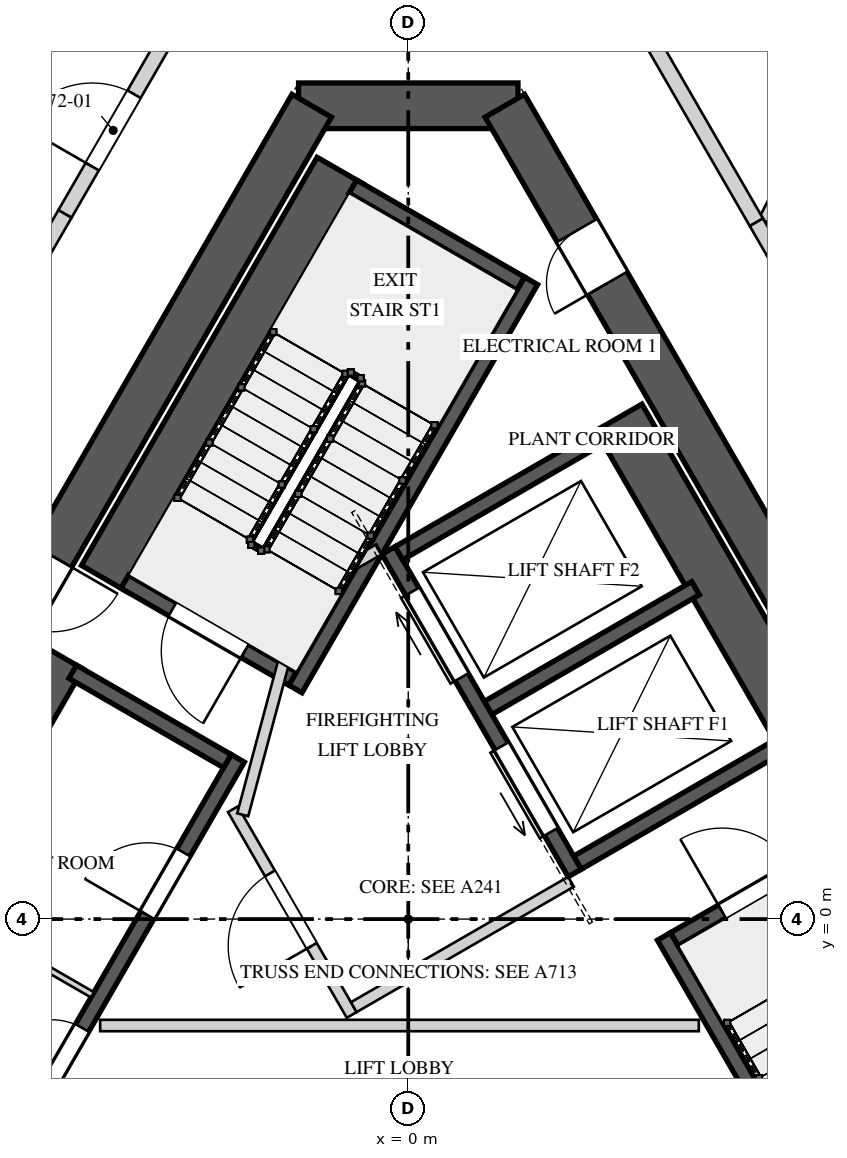
"""IFC4 building model, lengths in metres.
Left out: names, types, materials, properties, quantities, classifications, styles, units other than length and angle.
Written with IfcOpenShell. Run it as: python <this file> out.ifc"""

import sys

from ifc_helpers import new_model, si_unit, direction, frame, frame_2d, origin, place, context, subcontext, project, spatial, rectangle, extrude, element, fill, save


model = new_model("IFC4")
c1 = context("Model", 3, precision=1e-05, world=origin(), true_north=direction((0.0, 1.0)))
c2 = subcontext(c1, "Body", "Model", "MODEL_VIEW")
j1 = project(units=[si_unit("LENGTHUNIT", "METRE"), si_unit("PLANEANGLEUNIT", "RADIAN")], contexts=[c1])
p1 = place(None, origin())
s1 = spatial("IfcSite", under=j1, at=p1, CompositionType="ELEMENT")
p2 = place(p1, origin())
s2 = spatial("IfcBuilding", under=s1, at=p2, CompositionType="ELEMENT")
p3 = place(p2, frame((0.0, 0.0, 306.4)))
s3 = spatial("IfcBuildingStorey", under=s2, at=p3, CompositionType="ELEMENT", Elevation=306.4)
p4 = place(p3, frame((1.443, 10.7, 0.0), z_axis=(0.0, 0.0, 1.0), x_axis=(-1.0, 0.0, 0.0)))
e1 = element("IfcWall", 1, at=p4, inside=s3, PredefinedType="SHEAR", context=c2, shape_type="SweptSolid", body=[
    extrude(rectangle(XDim=2.887, YDim=0.6, at=frame_2d((1.443, 0.0))), origin(), (0.0, 0.0, 1.0), 14.0),
])
p5 = place(p3, frame((-1.27, 10.7, 0.0), z_axis=(0.0, 0.0, 1.0), x_axis=(-0.499999536116, -0.866025671608, 0.0)))
e2 = element("IfcWall", 2, at=p5, inside=s3, PredefinedType="SHEAR", context=c2, shape_type="SweptSolid", body=[
    extrude(rectangle(XDim=17.263, YDim=0.6, at=frame_2d((8.631, 0.0))), origin(), (0.0, 0.0, 1.0), 14.0),
])
p6 = place(p5, frame((6.836, 0.0, 0.0)))
e3 = element("IfcOpeningElement", 3, at=p6, cuts=e2, PredefinedType="OPENING", context=c2, shape_type="SweptSolid", body=[
    extrude(rectangle(XDim=1.0, YDim=2.4, at=frame_2d((0.5, 1.2))), frame((0.0, 0.31, 0.0), z_axis=(0.0, -1.0, 0.0), x_axis=(1.0, 0.0, 0.0)), (0.0, 0.0, 1.0), 0.62),
])
p7 = place(p3, frame((9.902, -4.25, 0.0), z_axis=(0.0, 0.0, 1.0), x_axis=(-0.499999536116, 0.866025671608, 0.0)))
e4 = element("IfcWall", 4, at=p7, inside=s3, PredefinedType="SHEAR", context=c2, shape_type="SweptSolid", body=[
    extrude(rectangle(XDim=17.263, YDim=0.6, at=frame_2d((8.631, 0.0))), origin(), (0.0, 0.0, 1.0), 14.0),
])
p8 = place(p7, frame((6.906, 0.0, 0.0)))
e5 = element("IfcOpeningElement", 5, at=p8, cuts=e4, PredefinedType="OPENING", context=c2, shape_type="SweptSolid", body=[
    extrude(rectangle(XDim=1.0, YDim=2.4, at=frame_2d((0.5, 1.2))), frame((0.0, 0.31, 0.0), z_axis=(0.0, -1.0, 0.0), x_axis=(1.0, 0.0, 0.0)), (0.0, 0.0, 1.0), 0.62),
])
p9 = place(p7, frame((14.567, 0.0, 0.0)))
e6 = element("IfcOpeningElement", 6, at=p9, cuts=e4, PredefinedType="OPENING", context=c2, shape_type="SweptSolid", body=[
    extrude(rectangle(XDim=0.8, YDim=2.1, at=frame_2d((0.4, 1.05))), frame((0.0, 0.31, 0.0), z_axis=(0.0, -1.0, 0.0), x_axis=(1.0, 0.0, 0.0)), (0.0, 0.0, 1.0), 0.62),
])
p10 = place(p3, frame((-0.896, 9.847, 0.0), z_axis=(0.0, 0.0, 1.0), x_axis=(-0.500009909098, -0.866019682689, 0.0)))
e7 = element("IfcWall", 7, at=p10, inside=s3, PredefinedType="SOLIDWALL", context=c2, shape_type="SweptSolid", body=[
    extrude(rectangle(XDim=6.2, YDim=0.7, at=frame_2d((3.1, 0.0))), origin(), (0.0, 0.0, 1.0), 13.65),
])
p11 = place(p3, frame((1.615, 8.397, 0.0), z_axis=(0.0, 0.0, 1.0), x_axis=(-0.500009909098, -0.866019682689, 0.0)))
e8 = element("IfcWall", 8, at=p11, inside=s3, PredefinedType="SOLIDWALL", context=c2, shape_type="SweptSolid", body=[
    extrude(rectangle(XDim=6.2, YDim=0.2, at=frame_2d((3.1, 0.0))), origin(), (0.0, 0.0, 1.0), 13.65),
])
p12 = place(p3, frame((1.479, 8.361, 0.0), z_axis=(0.0, 0.0, 1.0), x_axis=(-0.865989465428, 0.500062241894, 0.0)))
e9 = element("IfcWall", 9, at=p12, inside=s3, PredefinedType="SOLIDWALL", context=c2, shape_type="SweptSolid", body=[
    extrude(rectangle(XDim=2.55, YDim=0.2, at=frame_2d((1.275, 0.0))), origin(), (0.0, 0.0, 1.0), 13.65),
])
p13 = place(p3, frame((-1.521, 3.165, 0.0), z_axis=(0.0, 0.0, 1.0), x_axis=(-0.866030925526, 0.499990435942, 0.0)))
e10 = element("IfcWall", 10, at=p13, inside=s3, PredefinedType="SOLIDWALL", context=c2, shape_type="SweptSolid", body=[
    extrude(rectangle(XDim=2.55, YDim=0.2, at=frame_2d((1.275, 0.0))), origin(), (0.0, 0.0, 1.0), 13.65),
])
p14 = place(p13, frame((0.725, 0.0, 0.0)))
e11 = element("IfcOpeningElement", 11, at=p14, cuts=e10, PredefinedType="OPENING", context=c2, shape_type="SweptSolid", body=[
    extrude(rectangle(XDim=1.1, YDim=2.4, at=frame_2d((0.55, 1.2))), frame((0.0, 0.11, 0.0), z_axis=(0.0, -1.0, 0.0), x_axis=(1.0, 0.0, 0.0)), (0.0, 0.0, 1.0), 0.22),
])
p15 = place(p3, frame((6.465, -5.597, 0.0), z_axis=(0.0, 0.0, 1.0), x_axis=(-0.49998037582, 0.866036733513, 0.0)))
e12 = element("IfcWall", 12, at=p15, inside=s3, PredefinedType="SOLIDWALL", context=c2, shape_type="SweptSolid", body=[
    extrude(rectangle(XDim=6.2, YDim=0.2, at=frame_2d((3.1, 0.0))), origin(), (0.0, 0.0, 1.0), 13.65),
])
p16 = place(p3, frame((3.501, -0.265, 0.0), z_axis=(0.0, 0.0, 1.0), x_axis=(0.866030925526, 0.499990435942, 0.0)))
e13 = element("IfcWall", 13, at=p16, inside=s3, PredefinedType="SOLIDWALL", context=c2, shape_type="SweptSolid", body=[
    extrude(rectangle(XDim=2.55, YDim=0.2, at=frame_2d((1.275, 0.0))), origin(), (0.0, 0.0, 1.0), 13.65),
])
p17 = place(p16, frame((0.725, 0.0, 0.0)))
e14 = element("IfcOpeningElement", 14, at=p17, cuts=e13, PredefinedType="OPENING", context=c2, shape_type="SweptSolid", body=[
    extrude(rectangle(XDim=1.1, YDim=2.4, at=frame_2d((0.55, 1.2))), frame((0.0, 0.11, 0.0), z_axis=(0.0, -1.0, 0.0), x_axis=(1.0, 0.0, 0.0)), (0.0, 0.0, 1.0), 0.22),
])
p18 = place(p3, frame((-4.993, -2.648, 0.0), z_axis=(0.0, 0.0, 1.0), x_axis=(0.499996545922, 0.866027397988, 0.0)))
e15 = element("IfcWall", 15, at=p18, inside=s3, PredefinedType="SOLIDWALL", context=c2, shape_type="SweptSolid", body=[
    extrude(rectangle(XDim=5.5, YDim=0.2, at=frame_2d((2.75, 0.0))), origin(), (0.0, 0.0, 1.0), 13.65),
])
p19 = place(p18, frame((3.12, 0.0, 0.0)))
e16 = element("IfcOpeningElement", 16, at=p19, cuts=e15, PredefinedType="OPENING", context=c2, shape_type="SweptSolid", body=[
    extrude(rectangle(XDim=0.95, YDim=2.4, at=frame_2d((0.475, 1.2))), frame((0.0, 0.11, 0.0), z_axis=(0.0, -1.0, 0.0), x_axis=(1.0, 0.0, 0.0)), (0.0, 0.0, 1.0), 0.22),
])
p20 = place(p18, frame((0.605, 0.0, 0.0)))
e17 = element("IfcOpeningElement", 17, at=p20, cuts=e15, PredefinedType="OPENING", context=c2, shape_type="SweptSolid", body=[
    extrude(rectangle(XDim=0.8, YDim=2.1, at=frame_2d((0.4, 1.05))), frame((0.0, 0.11, 0.0), z_axis=(0.0, -1.0, 0.0), x_axis=(1.0, 0.0, 0.0)), (0.0, 0.0, 1.0), 0.22),
])
p21 = place(p3, frame((-4.581, 3.465, 0.0), z_axis=(0.0, 0.0, 1.0), x_axis=(-0.499996545922, -0.866027397988, 0.0)))
e18 = element("IfcWall", 18, at=p21, inside=s3, PredefinedType="SOLIDWALL", context=c2, shape_type="SweptSolid", body=[
    extrude(rectangle(XDim=5.5, YDim=0.7, at=frame_2d((2.75, 0.0))), origin(), (0.0, 0.0, 1.0), 13.65),
])
p22 = place(p3, frame((-2.38, 2.078, 0.0), z_axis=(0.0, 0.0, 1.0), x_axis=(-0.866061024631, 0.499938297808, 0.0)))
e19 = element("IfcWall", 19, at=p22, inside=s3, PredefinedType="SOLIDWALL", context=c2, shape_type="SweptSolid", body=[
    extrude(rectangle(XDim=2.35, YDim=0.2, at=frame_2d((1.175, 0.0))), origin(), (0.0, 0.0, 1.0), 13.65),
])
p23 = place(p3, frame((-4.155, -0.996, 0.0), z_axis=(0.0, 0.0, 1.0), x_axis=(-0.866016039709, 0.500016218704, 0.0)))
e20 = element("IfcWall", 20, at=p23, inside=s3, PredefinedType="PARTITIONING", context=c2, shape_type="SweptSolid", body=[
    extrude(rectangle(XDim=2.35, YDim=0.08, at=frame_2d((1.175, 0.0))), origin(), (0.0, 0.0, 1.0), 13.65),
])
p24 = place(p3, frame((2.19, 0.606, 0.0), z_axis=(0.0, 0.0, 1.0), x_axis=(-0.500002801628, 0.866023786258, 0.0)))
e21 = element("IfcWall", 21, at=p24, inside=s3, PredefinedType="SOLIDWALL", context=c2, shape_type="SweptSolid", body=[
    extrude(rectangle(XDim=4.9, YDim=0.2, at=frame_2d((2.45, 0.0))), origin(), (0.0, 0.0, 1.0), 13.65),
])
p25 = place(p24, frame((0.625, 0.0, 0.0)))
e22 = element("IfcOpeningElement", 22, at=p25, cuts=e21, PredefinedType="OPENING", context=c2, shape_type="SweptSolid", body=[
    extrude(rectangle(XDim=1.3, YDim=2.1, at=frame_2d((0.65, 1.05))), frame((0.0, 0.11, 0.0), z_axis=(0.0, -1.0, 0.0), x_axis=(1.0, 0.0, 0.0)), (0.0, 0.0, 1.0), 0.22),
])
p26 = place(p24, frame((2.975, 0.0, 0.0)))
e23 = element("IfcOpeningElement", 23, at=p26, cuts=e21, PredefinedType="OPENING", context=c2, shape_type="SweptSolid", body=[
    extrude(rectangle(XDim=1.3, YDim=2.1, at=frame_2d((0.65, 1.05))), frame((0.0, 0.11, 0.0), z_axis=(0.0, -1.0, 0.0), x_axis=(1.0, 0.0, 0.0)), (0.0, 0.0, 1.0), 0.22),
])
p27 = place(p3, frame((5.221, 2.356, 0.0), z_axis=(0.0, 0.0, 1.0), x_axis=(-0.500040169509, 0.866002210665, 0.0)))
e24 = element("IfcWall", 24, at=p27, inside=s3, PredefinedType="SOLIDWALL", context=c2, shape_type="SweptSolid", body=[
    extrude(rectangle(XDim=4.9, YDim=0.7, at=frame_2d((2.45, 0.0))), origin(), (0.0, 0.0, 1.0), 13.65),
])
for number, where, z_axis, x_axis in (
    (25, (2.227, 0.743, 0.0), (0.0, 0.0, 1.0), (0.866, 0.5, 0.0)),
    (26, (1.052, 2.778, 0.0), (0.0, 0.0, 1.0), (0.866, 0.5, 0.0)),
    (27, (-0.123, 4.813, 0.0), (0.0, 0.0, 1.0), (0.866, 0.5, 0.0)),
):
    element("IfcWall", number, at=place(p3, frame(where, z_axis=z_axis, x_axis=x_axis)), inside=s3, PredefinedType="SOLIDWALL", context=c2, shape_type="SweptSolid", body=[
        extrude(rectangle(XDim=3.15, YDim=0.2, at=frame_2d((1.575, 0.0))), origin(), (0.0, 0.0, 1.0), 13.65),
    ])
p28 = place(p3, frame((-0.744, -1.261, 0.0), z_axis=(0.0, 0.0, 1.0), x_axis=(-0.500004234368, 0.866022959057, 0.0)))
e28 = element("IfcWall", 28, at=p28, inside=s3, PredefinedType="PARTITIONING", context=c2, shape_type="SweptSolid", body=[
    extrude(rectangle(XDim=3.125, YDim=0.15, at=frame_2d((1.562, 0.0))), origin(), (0.0, 0.0, 1.0), 13.65),
])
p29 = place(p28, frame((1.05, 0.0, 0.0)))
e29 = element("IfcOpeningElement", 29, at=p29, cuts=e28, PredefinedType="OPENING", context=c2, shape_type="SweptSolid", body=[
    extrude(rectangle(XDim=1.1, YDim=2.4, at=frame_2d((0.55, 1.2))), frame((0.0, 0.085, 0.0), z_axis=(0.0, -1.0, 0.0), x_axis=(1.0, 0.0, 0.0)), (0.0, 0.0, 1.0), 0.17),
])
p30 = place(p3, frame((-0.717, -1.159, 0.0), z_axis=(0.0, 0.0, 1.0), x_axis=(0.866008176907, 0.50002983664, 0.0)))
e30 = element("IfcWall", 30, at=p30, inside=s3, PredefinedType="PARTITIONING", context=c2, shape_type="SweptSolid", body=[
    extrude(rectangle(XDim=3.3, YDim=0.15, at=frame_2d((1.65, 0.0))), origin(), (0.0, 0.0, 1.0), 13.65),
])
p31 = place(p3, frame((-2.178, 1.372, 0.0), z_axis=(0.0, 0.0, 1.0), x_axis=(0.258808958833, 0.96592852884, 0.0)))
e31 = element("IfcWall", 31, at=p31, inside=s3, PredefinedType="PARTITIONING", context=c2, shape_type="SweptSolid", body=[
    extrude(rectangle(XDim=2.903, YDim=0.15, at=frame_2d((1.451, 0.0))), origin(), (0.0, 0.0, 1.0), 13.65),
])
p32 = place(p3, frame((-1.51, 4.215, 0.0), z_axis=(0.0, 0.0, 1.0), x_axis=(0.866085525409, 0.49989585183, 0.0)))
e32 = element("IfcWall", 32, at=p32, inside=s3, PredefinedType="PARTITIONING", context=c2, shape_type="SweptSolid", body=[
    extrude(rectangle(XDim=1.3, YDim=0.15, at=frame_2d((0.65, 0.0))), origin(), (0.0, 0.0, 1.0), 13.65),
])
p33 = place(p3, frame((-4.053, -1.4, 0.0), z_axis=(0.0, 0.0, 1.0), x_axis=(1.0, 0.0, 0.0)))
e33 = element("IfcWall", 33, at=p33, inside=s3, PredefinedType="PARTITIONING", context=c2, shape_type="SweptSolid", body=[
    extrude(rectangle(XDim=7.876, YDim=0.15, at=frame_2d((3.938, 0.0))), origin(), (0.0, 0.0, 1.0), 13.65),
])
p34 = place(p3, frame((5.843, 11.467, 0.0), z_axis=(0.0, 0.0, 1.0), x_axis=(-0.454001617185, -0.891000859479, 0.0)))
e34 = element("IfcWall", 34, at=p34, inside=s3, PredefinedType="PARTITIONING", context=c2, shape_type="SweptSolid", body=[
    extrude(rectangle(XDim=2.556, YDim=0.15, at=frame_2d((1.278, 0.0))), origin(), (0.0, 0.0, 1.0), 12.95),
])
p35 = place(p3, frame((-4.929, 8.563, 0.0), z_axis=(0.0, 0.0, 1.0), x_axis=(0.500046299512, 0.865998671098, 0.0)))
e35 = element("IfcWall", 35, at=p35, inside=s3, PredefinedType="SOLIDWALL", context=c2, shape_type="SweptSolid", body=[
    extrude(rectangle(XDim=0.827, YDim=0.2, at=frame_2d((0.413, 0.0))), origin(), (0.0, 0.0, 1.0), 12.95),
])
p36 = place(p3, frame((-4.515, 9.279, 0.0), z_axis=(0.0, 0.0, 1.0), x_axis=(0.499975428181, 0.866039589866, 0.0)))
e36 = element("IfcWall", 36, at=p36, inside=s3, PredefinedType="SOLIDWALL", context=c2, shape_type="SweptSolid", body=[
    extrude(rectangle(XDim=4.066, YDim=0.2, at=frame_2d((2.033, 0.0))), origin(), (0.0, 0.0, 1.0), 13.65),
])
p37 = place(p36, frame((0.717, 0.0, 0.0)))
e37 = element("IfcOpeningElement", 37, at=p37, cuts=e36, PredefinedType="OPENING", context=c2, shape_type="SweptSolid", body=[
    extrude(rectangle(XDim=1.1, YDim=2.2, at=frame_2d((0.55, 1.1))), frame((0.0, 0.11, 0.0), z_axis=(0.0, -1.0, 0.0), x_axis=(1.0, 0.0, 0.0)), (0.0, 0.0, 1.0), 0.22),
])
p38 = place(p3, frame((2.483, 12.8, 0.0), z_axis=(0.0, 0.0, 1.0), x_axis=(0.499982771656, -0.866035350345, 0.0)))
e38 = element("IfcWall", 38, at=p38, inside=s3, PredefinedType="SOLIDWALL", context=c2, shape_type="SweptSolid", body=[
    extrude(rectangle(XDim=4.195, YDim=0.2, at=frame_2d((2.097, 0.0))), origin(), (0.0, 0.0, 1.0), 13.65),
])
p39 = place(p3, frame((4.58, 9.167, 0.0), z_axis=(0.0, 0.0, 1.0), x_axis=(0.499945576647, -0.866056822842, 0.0)))
e39 = element("IfcWall", 39, at=p39, inside=s3, PredefinedType="SOLIDWALL", context=c2, shape_type="SweptSolid", body=[
    extrude(rectangle(XDim=0.821, YDim=0.2, at=frame_2d((0.41, 0.0))), origin(), (0.0, 0.0, 1.0), 12.95),
])
p40 = place(p14, origin())
e40 = element("IfcDoor", 40, at=p40, inside=s3, OperationType="SINGLE_SWING_RIGHT", PredefinedType="DOOR", context=c2, shape_type="SweptSolid", body=[
    extrude(rectangle(XDim=1.1, YDim=2.4, at=frame_2d((0.55, 1.2))), frame((0.0, 0.025, 0.0), z_axis=(0.0, -1.0, 0.0), x_axis=(1.0, 0.0, 0.0)), (0.0, 0.0, 1.0), 0.05),
])
fill(e11, e40)
p41 = place(p17, origin())
e41 = element("IfcDoor", 41, at=p41, inside=s3, OperationType="SINGLE_SWING_RIGHT", PredefinedType="DOOR", context=c2, shape_type="SweptSolid", body=[
    extrude(rectangle(XDim=1.1, YDim=2.4, at=frame_2d((0.55, 1.2))), frame((0.0, 0.025, 0.0), z_axis=(0.0, -1.0, 0.0), x_axis=(1.0, 0.0, 0.0)), (0.0, 0.0, 1.0), 0.05),
])
fill(e14, e41)
p42 = place(p19, origin())
e42 = element("IfcDoor", 42, at=p42, inside=s3, OperationType="SINGLE_SWING_LEFT", PredefinedType="DOOR", context=c2, shape_type="SweptSolid", body=[
    extrude(rectangle(XDim=0.95, YDim=2.4, at=frame_2d((0.475, 1.2))), frame((0.0, 0.025, 0.0), z_axis=(0.0, -1.0, 0.0), x_axis=(1.0, 0.0, 0.0)), (0.0, 0.0, 1.0), 0.05),
])
fill(e16, e42)
p43 = place(p20, origin())
e43 = element("IfcDoor", 43, at=p43, inside=s3, OperationType="SINGLE_SWING_RIGHT", PredefinedType="DOOR", context=c2, shape_type="SweptSolid", body=[
    extrude(rectangle(XDim=0.8, YDim=2.1, at=frame_2d((0.4, 1.05))), frame((0.0, 0.025, 0.0), z_axis=(0.0, -1.0, 0.0), x_axis=(1.0, 0.0, 0.0)), (0.0, 0.0, 1.0), 0.05),
])
fill(e17, e43)
p44 = place(p25, origin())
e44 = element("IfcDoor", 44, at=p44, inside=s3, OperationType="SLIDING_TO_LEFT", PredefinedType="DOOR", context=c2, shape_type="SweptSolid", body=[
    extrude(rectangle(XDim=1.3, YDim=2.1, at=frame_2d((0.65, 1.05))), frame((0.0, 0.025, 0.0), z_axis=(0.0, -1.0, 0.0), x_axis=(1.0, 0.0, 0.0)), (0.0, 0.0, 1.0), 0.05),
])
fill(e22, e44)
p45 = place(p26, origin())
e45 = element("IfcDoor", 45, at=p45, inside=s3, OperationType="SLIDING_TO_RIGHT", PredefinedType="DOOR", context=c2, shape_type="SweptSolid", body=[
    extrude(rectangle(XDim=1.3, YDim=2.1, at=frame_2d((0.65, 1.05))), frame((0.0, 0.025, 0.0), z_axis=(0.0, -1.0, 0.0), x_axis=(1.0, 0.0, 0.0)), (0.0, 0.0, 1.0), 0.05),
])
fill(e23, e45)
p46 = place(p29, origin())
e46 = element("IfcDoor", 46, at=p46, inside=s3, OperationType="SINGLE_SWING_LEFT", PredefinedType="DOOR", context=c2, shape_type="SweptSolid", body=[
    extrude(rectangle(XDim=1.1, YDim=2.4, at=frame_2d((0.55, 1.2))), frame((0.0, 0.025, 0.0), z_axis=(0.0, -1.0, 0.0), x_axis=(1.0, 0.0, 0.0)), (0.0, 0.0, 1.0), 0.05),
])
fill(e29, e46)
p47 = place(p6, origin())
e47 = element("IfcDoor", 47, at=p47, inside=s3, OperationType="SINGLE_SWING_RIGHT", PredefinedType="DOOR", context=c2, shape_type="SweptSolid", body=[
    extrude(rectangle(XDim=1.0, YDim=2.4, at=frame_2d((0.5, 1.2))), frame((0.0, 0.025, 0.0), z_axis=(0.0, -1.0, 0.0), x_axis=(1.0, 0.0, 0.0)), (0.0, 0.0, 1.0), 0.05),
])
fill(e3, e47)
p48 = place(p9, origin())
e48 = element("IfcDoor", 48, at=p48, inside=s3, OperationType="SINGLE_SWING_RIGHT", PredefinedType="DOOR", context=c2, shape_type="SweptSolid", body=[
    extrude(rectangle(XDim=0.8, YDim=2.1, at=frame_2d((0.4, 1.05))), frame((0.0, 0.025, 0.0), z_axis=(0.0, -1.0, 0.0), x_axis=(1.0, 0.0, 0.0)), (0.0, 0.0, 1.0), 0.05),
])
fill(e6, e48)
p49 = place(p37, origin())
e49 = element("IfcDoor", 49, at=p49, inside=s3, OperationType="SINGLE_SWING_LEFT", PredefinedType="DOOR", context=c2, shape_type="SweptSolid", body=[
    extrude(rectangle(XDim=1.1, YDim=2.2, at=frame_2d((0.55, 1.1))), frame((0.0, 0.025, 0.0), z_axis=(0.0, -1.0, 0.0), x_axis=(1.0, 0.0, 0.0)), (0.0, 0.0, 1.0), 0.05),
])
fill(e37, e49)
save(model, sys.argv[1])
